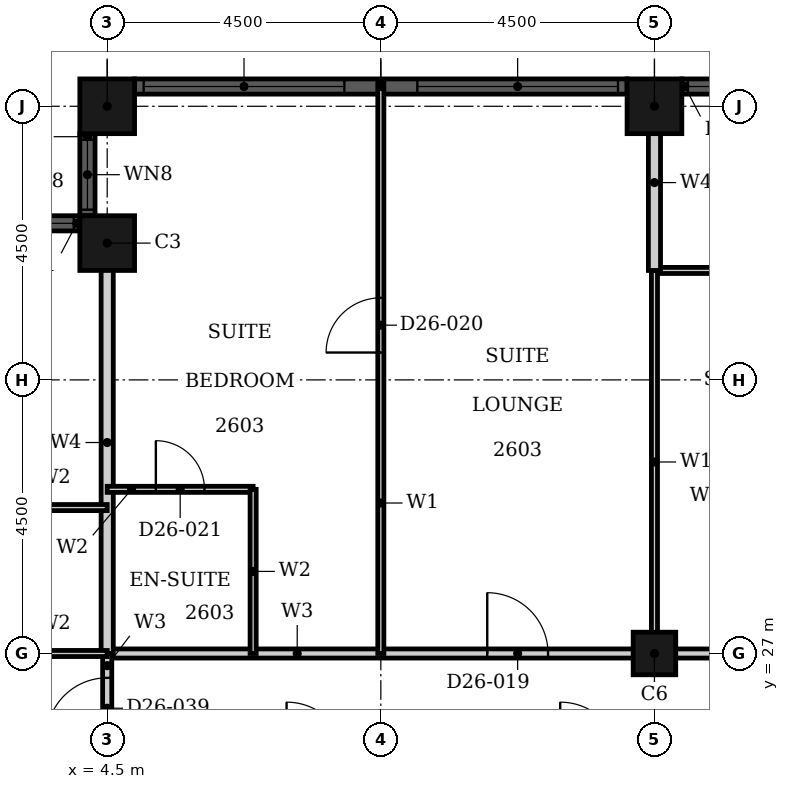
"""IFC4 building model, lengths in metres.
Left out: names, types, materials, properties, quantities, classifications, styles, units other than length and angle.
Written with IfcOpenShell. Run it as: python <this file> out.ifc"""

import sys

from ifc_helpers import new_model, si_unit, direction, frame, frame_2d, origin, origin_2d, place, context, subcontext, project, spatial, rectangle, hollow_rectangle, extrude, element, fill, save


model = new_model("IFC4")
c1 = context("Model", 3, precision=1e-05, world=origin(), true_north=direction((0.0, 1.0)))
c2 = subcontext(c1, "Body", "Model", "MODEL_VIEW")
j1 = project(units=[si_unit("LENGTHUNIT", "METRE"), si_unit("PLANEANGLEUNIT", "RADIAN")], contexts=[c1])
p1 = place(None, origin())
s1 = spatial("IfcSite", under=j1, at=p1, CompositionType="ELEMENT")
p2 = place(p1, origin())
s2 = spatial("IfcBuilding", under=s1, at=p2, CompositionType="ELEMENT")
p3 = place(p2, frame((0.0, 0.0, 108.0)))
s3 = spatial("IfcBuildingStorey", under=s2, at=p3, CompositionType="ELEMENT", Elevation=108.0)
for number, where, z_axis, x_axis in (
    (1, (13.5, 36.0, 0.0), (0.0, 0.0, 1.0), (1.0, 0.0, 0.0)),
    (2, (4.5, 36.0, 0.0), (0.0, 0.0, 1.0), (1.0, 0.0, 0.0)),
    (3, (4.5, 33.75, 0.0), (0.0, 0.0, 1.0), (1.0, 0.0, 0.0)),
):
    element("IfcColumn", number, at=place(p3, frame(where, z_axis=z_axis, x_axis=x_axis)), inside=s3, PredefinedType="COLUMN", context=c2, shape_type="SweptSolid", body=[
        extrude(hollow_rectangle(XDim=0.9, YDim=0.9, WallThickness=0.028, at=origin_2d()), origin(), (0.0, 0.0, 1.0), 3.6),
    ])
p4 = place(p3, frame((13.5, 27.0, 0.0), z_axis=(0.0, 0.0, 1.0), x_axis=(1.0, 0.0, 0.0)))
e4 = element("IfcColumn", 4, at=p4, inside=s3, PredefinedType="COLUMN", context=c2, shape_type="SweptSolid", body=[
    extrude(hollow_rectangle(XDim=0.7, YDim=0.7, WallThickness=0.022, at=origin_2d()), origin(), (0.0, 0.0, 1.0), 3.6),
])
p5 = place(p3, frame((15.3, 36.325, 0.0), z_axis=(0.0, 0.0, 1.0), x_axis=(-1.0, 0.0, 0.0)))
e5 = element("IfcWall", 5, at=p5, inside=s3, PredefinedType="SOLIDWALL", context=c2, shape_type="SweptSolid", body=[
    extrude(rectangle(XDim=1.35, YDim=0.25, at=frame_2d((0.675, 0.0))), origin(), (0.0, 0.0, 1.0), 3.6),
])
p6 = place(p5, frame((0.1, 0.0, 0.9)))
e6 = element("IfcOpeningElement", 6, at=p6, cuts=e5, PredefinedType="OPENING", context=c2, shape_type="SweptSolid", body=[
    extrude(rectangle(XDim=1.15, YDim=2.08, at=frame_2d((0.575, 1.04))), frame((0.0, 0.135, 0.0), z_axis=(0.0, -1.0, 0.0), x_axis=(1.0, 0.0, 0.0)), (0.0, 0.0, 1.0), 0.27),
])
p7 = place(p3, frame((13.05, 36.325, 0.0), z_axis=(0.0, 0.0, 1.0), x_axis=(-1.0, 0.0, 0.0)))
e7 = element("IfcWall", 7, at=p7, inside=s3, PredefinedType="SOLIDWALL", context=c2, shape_type="SweptSolid", body=[
    extrude(rectangle(XDim=8.1, YDim=0.25, at=frame_2d((4.05, 0.0))), origin(), (0.0, 0.0, 1.0), 3.6),
])
p8 = place(p7, frame((0.15, 0.0, 0.9)))
e8 = element("IfcOpeningElement", 8, at=p8, cuts=e7, PredefinedType="OPENING", context=c2, shape_type="SweptSolid", body=[
    extrude(rectangle(XDim=3.3, YDim=2.08, at=frame_2d((1.65, 1.04))), frame((0.0, 0.135, 0.0), z_axis=(0.0, -1.0, 0.0), x_axis=(1.0, 0.0, 0.0)), (0.0, 0.0, 1.0), 0.27),
])
p9 = place(p7, frame((4.65, 0.0, 0.9)))
e9 = element("IfcOpeningElement", 9, at=p9, cuts=e7, PredefinedType="OPENING", context=c2, shape_type="SweptSolid", body=[
    extrude(rectangle(XDim=3.3, YDim=2.08, at=frame_2d((1.65, 1.04))), frame((0.0, 0.135, 0.0), z_axis=(0.0, -1.0, 0.0), x_axis=(1.0, 0.0, 0.0)), (0.0, 0.0, 1.0), 0.27),
])
p10 = place(p3, frame((4.175, 35.55, 0.0), z_axis=(0.0, 0.0, 1.0), x_axis=(0.0, -1.0, 0.0)))
e10 = element("IfcWall", 10, at=p10, inside=s3, PredefinedType="SOLIDWALL", context=c2, shape_type="SweptSolid", body=[
    extrude(rectangle(XDim=1.35, YDim=0.25, at=frame_2d((0.675, 0.0))), origin(), (0.0, 0.0, 1.0), 3.6),
])
p11 = place(p10, frame((0.1, 0.0, 0.9)))
e11 = element("IfcOpeningElement", 11, at=p11, cuts=e10, PredefinedType="OPENING", context=c2, shape_type="SweptSolid", body=[
    extrude(rectangle(XDim=1.15, YDim=2.08, at=frame_2d((0.575, 1.04))), frame((0.0, 0.135, 0.0), z_axis=(0.0, -1.0, 0.0), x_axis=(1.0, 0.0, 0.0)), (0.0, 0.0, 1.0), 0.27),
])
p12 = place(p3, frame((4.05, 34.075, 0.0), z_axis=(0.0, 0.0, 1.0), x_axis=(-1.0, 0.0, 0.0)))
e12 = element("IfcWall", 12, at=p12, inside=s3, PredefinedType="SOLIDWALL", context=c2, shape_type="SweptSolid", body=[
    extrude(rectangle(XDim=1.35, YDim=0.25, at=frame_2d((0.675, 0.0))), origin(), (0.0, 0.0, 1.0), 3.6),
])
p13 = place(p12, frame((0.1, 0.0, 0.9)))
e13 = element("IfcOpeningElement", 13, at=p13, cuts=e12, PredefinedType="OPENING", context=c2, shape_type="SweptSolid", body=[
    extrude(rectangle(XDim=1.15, YDim=2.08, at=frame_2d((0.575, 1.04))), frame((0.0, 0.135, 0.0), z_axis=(0.0, -1.0, 0.0), x_axis=(1.0, 0.0, 0.0)), (0.0, 0.0, 1.0), 0.27),
])
p14 = place(p3, frame((4.5, 27.0, 0.0), z_axis=(0.0, 0.0, 1.0), x_axis=(1.0, 0.0, 0.0)))
e14 = element("IfcWall", 14, at=p14, inside=s3, PredefinedType="PARTITIONING", context=c2, shape_type="SweptSolid", body=[
    extrude(rectangle(XDim=11.7, YDim=0.15, at=frame_2d((5.85, 0.0))), origin(), (0.0, 0.0, 1.0), 2.58),
])
p15 = place(p14, frame((6.25, 0.0, 0.0)))
e15 = element("IfcOpeningElement", 15, at=p15, cuts=e14, PredefinedType="OPENING", context=c2, shape_type="SweptSolid", body=[
    extrude(rectangle(XDim=1.0, YDim=2.1, at=frame_2d((0.5, 1.05))), frame((0.0, 0.085, 0.0), z_axis=(0.0, -1.0, 0.0), x_axis=(1.0, 0.0, 0.0)), (0.0, 0.0, 1.0), 0.17),
])
p16 = place(p3, frame((4.5, 25.2, 0.0), z_axis=(0.0, 0.0, 1.0), x_axis=(0.0, 1.0, 0.0)))
e16 = element("IfcWall", 16, at=p16, inside=s3, PredefinedType="PARTITIONING", context=c2, shape_type="SweptSolid", body=[
    extrude(rectangle(XDim=1.8, YDim=0.15, at=frame_2d((0.9, 0.0))), origin(), (0.0, 0.0, 1.0), 3.3),
])
p17 = place(p16, frame((0.4, 0.0, 0.0)))
e17 = element("IfcOpeningElement", 17, at=p17, cuts=e16, PredefinedType="OPENING", context=c2, shape_type="SweptSolid", body=[
    extrude(rectangle(XDim=1.0, YDim=2.1, at=frame_2d((0.5, 1.05))), frame((0.0, 0.085, 0.0), z_axis=(0.0, -1.0, 0.0), x_axis=(1.0, 0.0, 0.0)), (0.0, 0.0, 1.0), 0.17),
])
p18 = place(p3, frame((13.5, 33.3, 0.0), z_axis=(0.0, 0.0, 1.0), x_axis=(1.0, 0.0, 0.0)))
e18 = element("IfcWall", 18, at=p18, inside=s3, PredefinedType="PARTITIONING", context=c2, shape_type="SweptSolid", body=[
    extrude(rectangle(XDim=2.7, YDim=0.1, at=frame_2d((1.35, 0.0))), origin(), (0.0, 0.0, 1.0), 3.3),
])
p19 = place(p3, frame((13.5, 27.0, 0.0), z_axis=(0.0, 0.0, 1.0), x_axis=(0.0, 1.0, 0.0)))
e19 = element("IfcWall", 19, at=p19, inside=s3, PredefinedType="PARTITIONING", context=c2, shape_type="SweptSolid", body=[
    extrude(rectangle(XDim=6.3, YDim=0.1, at=frame_2d((3.15, 0.0))), origin(), (0.0, 0.0, 1.0), 2.38),
])
p20 = place(p3, frame((9.0, 27.0, 0.0), z_axis=(0.0, 0.0, 1.0), x_axis=(0.0, 1.0, 0.0)))
e20 = element("IfcWall", 20, at=p20, inside=s3, PredefinedType="PARTITIONING", context=c2, shape_type="SweptSolid", body=[
    extrude(rectangle(XDim=9.39, YDim=0.1, at=frame_2d((4.695, 0.0))), origin(), (0.0, 0.0, 1.0), 3.3),
])
p21 = place(p20, frame((4.95, 0.0, 0.0)))
e21 = element("IfcOpeningElement", 21, at=p21, cuts=e20, PredefinedType="OPENING", context=c2, shape_type="SweptSolid", body=[
    extrude(rectangle(XDim=0.9, YDim=2.1, at=frame_2d((0.45, 1.05))), frame((0.0, 0.06, 0.0), z_axis=(0.0, -1.0, 0.0), x_axis=(1.0, 0.0, 0.0)), (0.0, 0.0, 1.0), 0.12),
])
p22 = place(p3, frame((13.5, 33.3, 0.0), z_axis=(0.0, 0.0, 1.0), x_axis=(0.0, 1.0, 0.0)))
e22 = element("IfcWall", 22, at=p22, inside=s3, PredefinedType="PARTITIONING", context=c2, shape_type="SweptSolid", body=[
    extrude(rectangle(XDim=2.89, YDim=0.2, at=frame_2d((1.445, 0.0))), origin(), (0.0, 0.0, 1.0), 2.38),
])
p23 = place(p3, frame((4.5, 27.0, 0.0), z_axis=(0.0, 0.0, 1.0), x_axis=(0.0, 1.0, 0.0)))
e23 = element("IfcWall", 23, at=p23, inside=s3, PredefinedType="PARTITIONING", context=c2, shape_type="SweptSolid", body=[
    extrude(rectangle(XDim=6.94, YDim=0.2, at=frame_2d((3.47, 0.0))), origin(), (0.0, 0.0, 1.0), 3.3),
])
p24 = place(p3, frame((1.8, 27.0, 0.0), z_axis=(0.0, 0.0, 1.0), x_axis=(1.0, 0.0, 0.0)))
e24 = element("IfcWall", 24, at=p24, inside=s3, PredefinedType="PARTITIONING", context=c2, shape_type="SweptSolid", body=[
    extrude(rectangle(XDim=2.7, YDim=0.1, at=frame_2d((1.35, 0.0))), origin(), (0.0, 0.0, 1.0), 2.58),
])
p25 = place(p3, frame((1.8, 29.4, 0.0), z_axis=(0.0, 0.0, 1.0), x_axis=(1.0, 0.0, 0.0)))
e25 = element("IfcWall", 25, at=p25, inside=s3, PredefinedType="PARTITIONING", context=c2, shape_type="SweptSolid", body=[
    extrude(rectangle(XDim=2.7, YDim=0.1, at=frame_2d((1.35, 0.0))), origin(), (0.0, 0.0, 1.0), 3.3),
])
p26 = place(p3, frame((4.5, 29.7, 0.0), z_axis=(0.0, 0.0, 1.0), x_axis=(1.0, 0.0, 0.0)))
e26 = element("IfcWall", 26, at=p26, inside=s3, PredefinedType="PARTITIONING", context=c2, shape_type="SweptSolid", body=[
    extrude(rectangle(XDim=2.4, YDim=0.1, at=frame_2d((1.2, 0.0))), origin(), (0.0, 0.0, 1.0), 3.3),
])
p27 = place(p26, frame((0.8, 0.0, 0.0)))
e27 = element("IfcOpeningElement", 27, at=p27, cuts=e26, PredefinedType="OPENING", context=c2, shape_type="SweptSolid", body=[
    extrude(rectangle(XDim=0.8, YDim=2.1, at=frame_2d((0.4, 1.05))), frame((0.0, 0.06, 0.0), z_axis=(0.0, -1.0, 0.0), x_axis=(1.0, 0.0, 0.0)), (0.0, 0.0, 1.0), 0.12),
])
p28 = place(p3, frame((6.9, 27.0, 0.0), z_axis=(0.0, 0.0, 1.0), x_axis=(0.0, 1.0, 0.0)))
e28 = element("IfcWall", 28, at=p28, inside=s3, PredefinedType="PARTITIONING", context=c2, shape_type="SweptSolid", body=[
    extrude(rectangle(XDim=2.7, YDim=0.1, at=frame_2d((1.35, 0.0))), origin(), (0.0, 0.0, 1.0), 3.3),
])
p29 = place(p6, origin())
e29 = element("IfcWindow", 29, at=p29, inside=s3, PartitioningType="SINGLE_PANEL", PredefinedType="WINDOW", context=c2, shape_type="SweptSolid", body=[
    extrude(rectangle(XDim=1.15, YDim=2.08, at=frame_2d((0.575, 1.04))), frame((0.0, 0.03, 0.0), z_axis=(0.0, -1.0, 0.0), x_axis=(1.0, 0.0, 0.0)), (0.0, 0.0, 1.0), 0.06),
])
fill(e6, e29)
p30 = place(p8, origin())
e30 = element("IfcWindow", 30, at=p30, inside=s3, PartitioningType="SINGLE_PANEL", PredefinedType="WINDOW", context=c2, shape_type="SweptSolid", body=[
    extrude(rectangle(XDim=3.3, YDim=2.08, at=frame_2d((1.65, 1.04))), frame((0.0, 0.03, 0.0), z_axis=(0.0, -1.0, 0.0), x_axis=(1.0, 0.0, 0.0)), (0.0, 0.0, 1.0), 0.06),
])
fill(e8, e30)
p31 = place(p9, origin())
e31 = element("IfcWindow", 31, at=p31, inside=s3, PartitioningType="SINGLE_PANEL", PredefinedType="WINDOW", context=c2, shape_type="SweptSolid", body=[
    extrude(rectangle(XDim=3.3, YDim=2.08, at=frame_2d((1.65, 1.04))), frame((0.0, 0.03, 0.0), z_axis=(0.0, -1.0, 0.0), x_axis=(1.0, 0.0, 0.0)), (0.0, 0.0, 1.0), 0.06),
])
fill(e9, e31)
p32 = place(p11, origin())
e32 = element("IfcWindow", 32, at=p32, inside=s3, PartitioningType="SINGLE_PANEL", PredefinedType="WINDOW", context=c2, shape_type="SweptSolid", body=[
    extrude(rectangle(XDim=1.15, YDim=2.08, at=frame_2d((0.575, 1.04))), frame((0.0, 0.03, 0.0), z_axis=(0.0, -1.0, 0.0), x_axis=(1.0, 0.0, 0.0)), (0.0, 0.0, 1.0), 0.06),
])
fill(e11, e32)
p33 = place(p13, origin())
e33 = element("IfcWindow", 33, at=p33, inside=s3, PartitioningType="SINGLE_PANEL", PredefinedType="WINDOW", context=c2, shape_type="SweptSolid", body=[
    extrude(rectangle(XDim=1.15, YDim=2.08, at=frame_2d((0.575, 1.04))), frame((0.0, 0.03, 0.0), z_axis=(0.0, -1.0, 0.0), x_axis=(1.0, 0.0, 0.0)), (0.0, 0.0, 1.0), 0.06),
])
fill(e13, e33)
p34 = place(p15, origin())
e34 = element("IfcDoor", 34, at=p34, inside=s3, OperationType="SINGLE_SWING_RIGHT", PredefinedType="DOOR", context=c2, shape_type="SweptSolid", body=[
    extrude(rectangle(XDim=1.0, YDim=2.1, at=frame_2d((0.5, 1.05))), frame((0.0, 0.025, 0.0), z_axis=(0.0, -1.0, 0.0), x_axis=(1.0, 0.0, 0.0)), (0.0, 0.0, 1.0), 0.05),
])
fill(e15, e34)
p35 = place(p21, origin())
e35 = element("IfcDoor", 35, at=p35, inside=s3, OperationType="SINGLE_SWING_RIGHT", PredefinedType="DOOR", context=c2, shape_type="SweptSolid", body=[
    extrude(rectangle(XDim=0.9, YDim=2.1, at=frame_2d((0.45, 1.05))), frame((0.0, 0.025, 0.0), z_axis=(0.0, -1.0, 0.0), x_axis=(1.0, 0.0, 0.0)), (0.0, 0.0, 1.0), 0.05),
])
fill(e21, e35)
p36 = place(p27, origin())
e36 = element("IfcDoor", 36, at=p36, inside=s3, OperationType="SINGLE_SWING_RIGHT", PredefinedType="DOOR", context=c2, shape_type="SweptSolid", body=[
    extrude(rectangle(XDim=0.8, YDim=2.1, at=frame_2d((0.4, 1.05))), frame((0.0, 0.025, 0.0), z_axis=(0.0, -1.0, 0.0), x_axis=(1.0, 0.0, 0.0)), (0.0, 0.0, 1.0), 0.05),
])
fill(e27, e36)
p37 = place(p17, origin())
e37 = element("IfcDoor", 37, at=p37, inside=s3, OperationType="SINGLE_SWING_LEFT", PredefinedType="DOOR", context=c2, shape_type="SweptSolid", body=[
    extrude(rectangle(XDim=1.0, YDim=2.1, at=frame_2d((0.5, 1.05))), frame((0.0, 0.025, 0.0), z_axis=(0.0, -1.0, 0.0), x_axis=(1.0, 0.0, 0.0)), (0.0, 0.0, 1.0), 0.05),
])
fill(e17, e37)
save(model, sys.argv[1])
